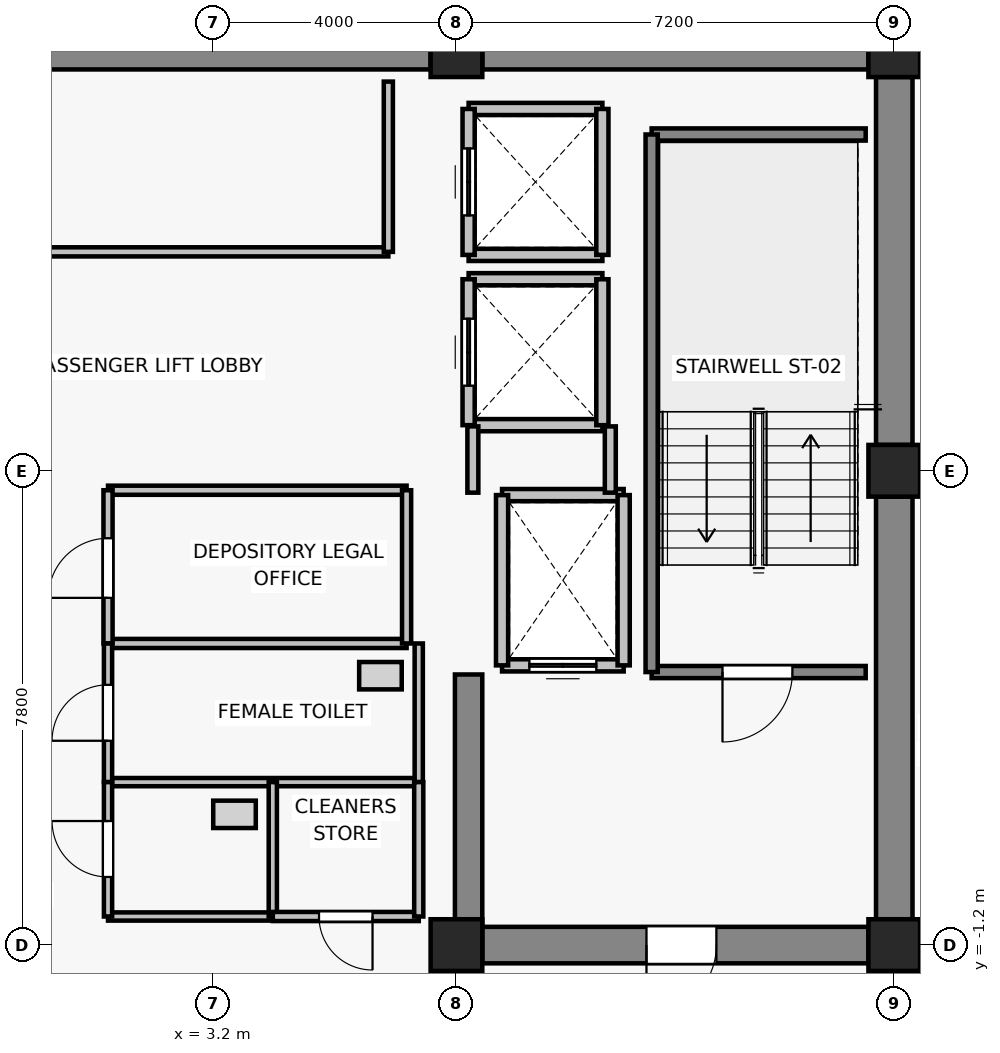
"""IFC4 building model, lengths in metres.
Left out: names, types, materials, properties, quantities, classifications, styles, units other than length and angle.
Written with IfcOpenShell. Run it as: python <this file> out.ifc"""

import sys

from ifc_helpers import new_model, si_unit, direction, frame, frame_2d, origin, origin_2d, place, context, subcontext, project, spatial, rectangle, extrude, source, transform, mapped, element, fill, save


model = new_model("IFC4")
c1 = context("Model", 3, precision=1e-05, world=origin(), true_north=direction((0.0, 1.0)))
c2 = subcontext(c1, "Body", "Model", "MODEL_VIEW")
j1 = project(units=[si_unit("LENGTHUNIT", "METRE"), si_unit("PLANEANGLEUNIT", "RADIAN")], contexts=[c1])
p1 = place(None, origin())
s1 = spatial("IfcSite", under=j1, at=p1, CompositionType="ELEMENT")
p2 = place(p1, origin())
s2 = spatial("IfcBuilding", under=s1, at=p2, CompositionType="ELEMENT")
p3 = place(p2, frame((0.0, 0.0, 238.6)))
s3 = spatial("IfcBuildingStorey", under=s2, at=p3, CompositionType="ELEMENT", Elevation=238.6)
for number, where, z_axis, x_axis in (
    (1, (7.2, -1.2, 0.0), (0.0, 0.0, 1.0), (1.0, 0.0, 0.0)),
    (2, (14.4, -1.2, 0.0), (0.0, 0.0, 1.0), (1.0, 0.0, 0.0)),
    (3, (14.4, 6.6, 0.0), (0.0, 0.0, 1.0), (1.0, 0.0, 0.0)),
    (4, (7.2, 13.5, 0.0), (0.0, 0.0, 1.0), (1.0, 0.0, 0.0)),
    (5, (14.4, 13.5, 0.0), (0.0, 0.0, 1.0), (1.0, 0.0, 0.0)),
):
    element("IfcColumn", number, at=place(p3, frame(where, z_axis=z_axis, x_axis=x_axis)), inside=s3, PredefinedType="COLUMN", context=c2, shape_type="SweptSolid", body=[
        extrude(rectangle(XDim=0.85, YDim=0.85, at=origin_2d()), origin(), (0.0, 0.0, 1.0), 3.3),
    ])
p4 = place(p3, frame((-6.775, 13.5, 0.0), z_axis=(0.0, 0.0, 1.0), x_axis=(1.0, 0.0, 0.0)))
e6 = element("IfcWall", 6, at=p4, inside=s3, PredefinedType="SHEAR", context=c2, shape_type="SweptSolid", body=[
    extrude(rectangle(XDim=13.55, YDim=0.6, at=frame_2d((6.775, 0.0))), origin(), (0.0, 0.0, 1.0), 3.075),
])
p5 = place(p3, frame((7.625, 13.5, 0.0), z_axis=(0.0, 0.0, 1.0), x_axis=(1.0, 0.0, 0.0)))
e7 = element("IfcWall", 7, at=p5, inside=s3, PredefinedType="SHEAR", context=c2, shape_type="SweptSolid", body=[
    extrude(rectangle(XDim=6.35, YDim=0.6, at=frame_2d((3.175, 0.0))), origin(), (0.0, 0.0, 1.0), 3.075),
])
p6 = place(p3, frame((14.4, -0.775, 0.0), z_axis=(0.0, 0.0, 1.0), x_axis=(0.0, 1.0, 0.0)))
e8 = element("IfcWall", 8, at=p6, inside=s3, PredefinedType="SHEAR", context=c2, shape_type="SweptSolid", body=[
    extrude(rectangle(XDim=6.95, YDim=0.6, at=frame_2d((3.475, 0.0))), origin(), (0.0, 0.0, 1.0), 3.075),
])
p7 = place(p3, frame((14.4, 7.025, 0.0), z_axis=(0.0, 0.0, 1.0), x_axis=(0.0, 1.0, 0.0)))
e9 = element("IfcWall", 9, at=p7, inside=s3, PredefinedType="SHEAR", context=c2, shape_type="SweptSolid", body=[
    extrude(rectangle(XDim=6.05, YDim=0.6, at=frame_2d((3.025, 0.0))), origin(), (0.0, 0.0, 1.0), 3.075),
])
p8 = place(p3, frame((13.975, -1.2, 0.0), z_axis=(0.0, 0.0, 1.0), x_axis=(-1.0, 0.0, 0.0)))
e10 = element("IfcWall", 10, at=p8, inside=s3, PredefinedType="SHEAR", context=c2, shape_type="SweptSolid", body=[
    extrude(rectangle(XDim=6.35, YDim=0.6, at=frame_2d((3.175, 0.0))), origin(), (0.0, 0.0, 1.0), 3.075),
])
p9 = place(p8, frame((2.5, 0.0, 0.0)))
e11 = element("IfcOpeningElement", 11, at=p9, cuts=e10, PredefinedType="OPENING", context=c2, shape_type="SweptSolid", body=[
    extrude(rectangle(XDim=1.15, YDim=2.15, at=frame_2d((0.575, 1.075))), frame((0.0, 0.31, 0.0), z_axis=(0.0, -1.0, 0.0), x_axis=(1.0, 0.0, 0.0)), (0.0, 0.0, 1.0), 0.62),
])
p10 = place(p3, frame((7.4, -0.9, 0.0), z_axis=(0.0, 0.0, 1.0), x_axis=(0.0, 1.0, 0.0)))
e12 = element("IfcWall", 12, at=p10, inside=s3, PredefinedType="SHEAR", context=c2, shape_type="SweptSolid", body=[
    extrude(rectangle(XDim=4.15, YDim=0.45, at=frame_2d((2.075, 0.0))), origin(), (0.0, 0.0, 1.0), 3.075),
])
p11 = place(p3, frame((9.95, 3.4, 0.0), z_axis=(0.0, 0.0, 1.0), x_axis=(-1.0, 0.0, 0.0)))
e13 = element("IfcWall", 13, at=p11, inside=s3, PredefinedType="SOLIDWALL", context=c2, shape_type="SweptSolid", body=[
    extrude(rectangle(XDim=2.0, YDim=0.2, at=frame_2d((1.0, 0.0))), origin(), (0.0, 0.0, 1.0), 3.075),
])
p12 = place(p11, frame((0.45, 0.0, 0.0)))
e14 = element("IfcOpeningElement", 14, at=p12, cuts=e13, PredefinedType="OPENING", context=c2, shape_type="SweptSolid", body=[
    extrude(rectangle(XDim=1.1, YDim=2.2, at=frame_2d((0.55, 1.1))), frame((0.0, 0.11, 0.0), z_axis=(0.0, -1.0, 0.0), x_axis=(1.0, 0.0, 0.0)), (0.0, 0.0, 1.0), 0.22),
])
p13 = place(p3, frame((7.95, 6.2, 0.0), z_axis=(0.0, 0.0, 1.0), x_axis=(1.0, 0.0, 0.0)))
e15 = element("IfcWall", 15, at=p13, inside=s3, PredefinedType="SOLIDWALL", context=c2, shape_type="SweptSolid", body=[
    extrude(rectangle(XDim=2.0, YDim=0.2, at=frame_2d((1.0, 0.0))), origin(), (0.0, 0.0, 1.0), 3.075),
])
for number, where, z_axis, x_axis in (
    (16, (7.95, 3.4, 0.0), (0.0, 0.0, 1.0), (0.0, 1.0, 0.0)),
    (17, (9.95, 6.2, 0.0), (0.0, 0.0, 1.0), (0.0, -1.0, 0.0)),
):
    element("IfcWall", number, at=place(p3, frame(where, z_axis=z_axis, x_axis=x_axis)), inside=s3, PredefinedType="SOLIDWALL", context=c2, shape_type="SweptSolid", body=[
        extrude(rectangle(XDim=2.8, YDim=0.2, at=frame_2d((1.4, 0.0))), origin(), (0.0, 0.0, 1.0), 3.075),
    ])
for number, where, z_axis, x_axis in (
    (18, (9.6, 7.35, 0.0), (0.0, 0.0, 1.0), (-1.0, 0.0, 0.0)),
    (19, (7.4, 9.75, 0.0), (0.0, 0.0, 1.0), (1.0, 0.0, 0.0)),
):
    element("IfcWall", number, at=place(p3, frame(where, z_axis=z_axis, x_axis=x_axis)), inside=s3, PredefinedType="SOLIDWALL", context=c2, shape_type="SweptSolid", body=[
        extrude(rectangle(XDim=2.2, YDim=0.2, at=frame_2d((1.1, 0.0))), origin(), (0.0, 0.0, 1.0), 2.615),
    ])
p14 = place(p3, frame((7.4, 7.35, 0.0), z_axis=(0.0, 0.0, 1.0), x_axis=(0.0, 1.0, 0.0)))
e20 = element("IfcWall", 20, at=p14, inside=s3, PredefinedType="SOLIDWALL", context=c2, shape_type="SweptSolid", body=[
    extrude(rectangle(XDim=2.4, YDim=0.2, at=frame_2d((1.2, 0.0))), origin(), (0.0, 0.0, 1.0), 2.615),
])
p15 = place(p14, frame((0.65, 0.0, 0.0)))
e21 = element("IfcOpeningElement", 21, at=p15, cuts=e20, PredefinedType="OPENING", context=c2, shape_type="SweptSolid", body=[
    extrude(rectangle(XDim=1.1, YDim=2.2, at=frame_2d((0.55, 1.1))), frame((0.0, 0.11, 0.0), z_axis=(0.0, -1.0, 0.0), x_axis=(1.0, 0.0, 0.0)), (0.0, 0.0, 1.0), 0.22),
])
p16 = place(p3, frame((9.6, 9.75, 0.0), z_axis=(0.0, 0.0, 1.0), x_axis=(0.0, -1.0, 0.0)))
e22 = element("IfcWall", 22, at=p16, inside=s3, PredefinedType="SOLIDWALL", context=c2, shape_type="SweptSolid", body=[
    extrude(rectangle(XDim=2.4, YDim=0.2, at=frame_2d((1.2, 0.0))), origin(), (0.0, 0.0, 1.0), 3.075),
])
for number, where, z_axis, x_axis in (
    (23, (9.6, 10.15, 0.0), (0.0, 0.0, 1.0), (-1.0, 0.0, 0.0)),
    (24, (7.4, 12.55, 0.0), (0.0, 0.0, 1.0), (1.0, 0.0, 0.0)),
):
    element("IfcWall", number, at=place(p3, frame(where, z_axis=z_axis, x_axis=x_axis)), inside=s3, PredefinedType="SOLIDWALL", context=c2, shape_type="SweptSolid", body=[
        extrude(rectangle(XDim=2.2, YDim=0.2, at=frame_2d((1.1, 0.0))), origin(), (0.0, 0.0, 1.0), 2.615),
    ])
p17 = place(p3, frame((7.4, 10.15, 0.0), z_axis=(0.0, 0.0, 1.0), x_axis=(0.0, 1.0, 0.0)))
e25 = element("IfcWall", 25, at=p17, inside=s3, PredefinedType="SOLIDWALL", context=c2, shape_type="SweptSolid", body=[
    extrude(rectangle(XDim=2.4, YDim=0.2, at=frame_2d((1.2, 0.0))), origin(), (0.0, 0.0, 1.0), 2.615),
])
p18 = place(p17, frame((0.65, 0.0, 0.0)))
e26 = element("IfcOpeningElement", 26, at=p18, cuts=e25, PredefinedType="OPENING", context=c2, shape_type="SweptSolid", body=[
    extrude(rectangle(XDim=1.1, YDim=2.2, at=frame_2d((0.55, 1.1))), frame((0.0, 0.11, 0.0), z_axis=(0.0, -1.0, 0.0), x_axis=(1.0, 0.0, 0.0)), (0.0, 0.0, 1.0), 0.22),
])
p19 = place(p3, frame((9.6, 12.55, 0.0), z_axis=(0.0, 0.0, 1.0), x_axis=(0.0, -1.0, 0.0)))
e27 = element("IfcWall", 27, at=p19, inside=s3, PredefinedType="SOLIDWALL", context=c2, shape_type="SweptSolid", body=[
    extrude(rectangle(XDim=2.4, YDim=0.2, at=frame_2d((1.2, 0.0))), origin(), (0.0, 0.0, 1.0), 3.075),
])
p20 = place(p3, frame((13.93, 3.29, 0.0), z_axis=(0.0, 0.0, 1.0), x_axis=(-1.0, 0.0, 0.0)))
e28 = element("IfcWall", 28, at=p20, inside=s3, PredefinedType="SOLIDWALL", context=c2, shape_type="SweptSolid", body=[
    extrude(rectangle(XDim=3.52, YDim=0.2, at=frame_2d((1.76, 0.0))), origin(), (0.0, 0.0, 1.0), 3.075),
])
p21 = place(p20, frame((1.205, 0.0, 0.0)))
e29 = element("IfcOpeningElement", 29, at=p21, cuts=e28, PredefinedType="OPENING", context=c2, shape_type="SweptSolid", body=[
    extrude(rectangle(XDim=1.15, YDim=2.15, at=frame_2d((0.575, 1.075))), frame((0.0, 0.11, 0.0), z_axis=(0.0, -1.0, 0.0), x_axis=(1.0, 0.0, 0.0)), (0.0, 0.0, 1.0), 0.22),
])
p22 = place(p3, frame((10.41, 12.13, 0.0), z_axis=(0.0, 0.0, 1.0), x_axis=(1.0, 0.0, 0.0)))
e30 = element("IfcWall", 30, at=p22, inside=s3, PredefinedType="SOLIDWALL", context=c2, shape_type="SweptSolid", body=[
    extrude(rectangle(XDim=3.52, YDim=0.2, at=frame_2d((1.76, 0.0))), origin(), (0.0, 0.0, 1.0), 3.075),
])
p23 = place(p3, frame((10.41, 3.29, 0.0), z_axis=(0.0, 0.0, 1.0), x_axis=(0.0, 1.0, 0.0)))
e31 = element("IfcWall", 31, at=p23, inside=s3, PredefinedType="SOLIDWALL", context=c2, shape_type="SweptSolid", body=[
    extrude(rectangle(XDim=8.84, YDim=0.2, at=frame_2d((4.42, 0.0))), origin(), (0.0, 0.0, 1.0), 3.075),
])
p24 = place(p3, frame((7.47, 6.24, 0.0), z_axis=(0.0, 0.0, 1.0), x_axis=(0.0, 1.0, 0.0)))
e32 = element("IfcWall", 32, at=p24, inside=s3, PredefinedType="PARTITIONING", context=c2, shape_type="SweptSolid", body=[
    extrude(rectangle(XDim=1.09, YDim=0.18, at=frame_2d((0.545, 0.0))), origin(), (0.0, 0.0, 1.0), 2.615),
])
p25 = place(p3, frame((9.73, 7.33, 0.0), z_axis=(0.0, 0.0, 1.0), x_axis=(0.0, -1.0, 0.0)))
e33 = element("IfcWall", 33, at=p25, inside=s3, PredefinedType="PARTITIONING", context=c2, shape_type="SweptSolid", body=[
    extrude(rectangle(XDim=1.09, YDim=0.18, at=frame_2d((0.545, 0.0))), origin(), (0.0, 0.0, 1.0), 3.075),
])
p26 = place(p3, frame((6.08, 10.2, 0.0), z_axis=(0.0, 0.0, 1.0), x_axis=(-1.0, 0.0, 0.0)))
e34 = element("IfcWall", 34, at=p26, inside=s3, PredefinedType="PARTITIONING", context=c2, shape_type="SweptSolid", body=[
    extrude(rectangle(XDim=12.16, YDim=0.15, at=frame_2d((6.08, 0.0))), origin(), (0.0, 0.0, 1.0), 3.075),
])
p27 = place(p26, frame((7.005, 0.0, 0.0)))
e35 = element("IfcOpeningElement", 35, at=p27, cuts=e34, PredefinedType="OPENING", context=c2, shape_type="SweptSolid", body=[
    extrude(rectangle(XDim=1.15, YDim=2.15, at=frame_2d((0.575, 1.075))), frame((0.0, 0.085, 0.0), z_axis=(0.0, -1.0, 0.0), x_axis=(1.0, 0.0, 0.0)), (0.0, 0.0, 1.0), 0.17),
])
p28 = place(p3, frame((6.08, 13.0, 0.0), z_axis=(0.0, 0.0, 1.0), x_axis=(0.0, -1.0, 0.0)))
e36 = element("IfcWall", 36, at=p28, inside=s3, PredefinedType="PARTITIONING", context=c2, shape_type="SweptSolid", body=[
    extrude(rectangle(XDim=2.8, YDim=0.15, at=frame_2d((1.4, 0.0))), origin(), (0.0, 0.0, 1.0), 3.075),
])
for number, where, z_axis, x_axis in (
    (37, (6.38, 3.76, 0.0), (0.0, 0.0, 1.0), (-1.0, 0.0, 0.0)),
    (38, (1.47, 6.28, 0.0), (0.0, 0.0, 1.0), (1.0, 0.0, 0.0)),
):
    element("IfcWall", number, at=place(p3, frame(where, z_axis=z_axis, x_axis=x_axis)), inside=s3, PredefinedType="PARTITIONING", context=c2, shape_type="SweptSolid", body=[
        extrude(rectangle(XDim=4.91, YDim=0.15, at=frame_2d((2.455, 0.0))), origin(), (0.0, 0.0, 1.0), 3.075),
    ])
p29 = place(p3, frame((1.47, 3.76, 0.0), z_axis=(0.0, 0.0, 1.0), x_axis=(0.0, 1.0, 0.0)))
e39 = element("IfcWall", 39, at=p29, inside=s3, PredefinedType="PARTITIONING", context=c2, shape_type="SweptSolid", body=[
    extrude(rectangle(XDim=2.52, YDim=0.15, at=frame_2d((1.26, 0.0))), origin(), (0.0, 0.0, 1.0), 3.075),
])
p30 = place(p29, frame((0.75, 0.0, 0.0)))
e40 = element("IfcOpeningElement", 40, at=p30, cuts=e39, PredefinedType="OPENING", context=c2, shape_type="SweptSolid", body=[
    extrude(rectangle(XDim=0.98, YDim=2.15, at=frame_2d((0.49, 1.075))), frame((0.0, 0.085, 0.0), z_axis=(0.0, -1.0, 0.0), x_axis=(1.0, 0.0, 0.0)), (0.0, 0.0, 1.0), 0.17),
])
p31 = place(p3, frame((6.38, 6.28, 0.0), z_axis=(0.0, 0.0, 1.0), x_axis=(0.0, -1.0, 0.0)))
e41 = element("IfcWall", 41, at=p31, inside=s3, PredefinedType="PARTITIONING", context=c2, shape_type="SweptSolid", body=[
    extrude(rectangle(XDim=2.52, YDim=0.15, at=frame_2d((1.26, 0.0))), origin(), (0.0, 0.0, 1.0), 3.075),
])
p32 = place(p3, frame((6.58, 1.48, 0.0), z_axis=(0.0, 0.0, 1.0), x_axis=(-1.0, 0.0, 0.0)))
e42 = element("IfcWall", 42, at=p32, inside=s3, PredefinedType="PARTITIONING", context=c2, shape_type="SweptSolid", body=[
    extrude(rectangle(XDim=5.11, YDim=0.135, at=frame_2d((2.555, 0.0))), origin(), (0.0, 0.0, 1.0), 3.075),
])
p33 = place(p3, frame((1.47, 1.48, 0.0), z_axis=(0.0, 0.0, 1.0), x_axis=(0.0, 1.0, 0.0)))
e43 = element("IfcWall", 43, at=p33, inside=s3, PredefinedType="PARTITIONING", context=c2, shape_type="SweptSolid", body=[
    extrude(rectangle(XDim=2.28, YDim=0.135, at=frame_2d((1.14, 0.0))), origin(), (0.0, 0.0, 1.0), 3.075),
])
p34 = place(p33, frame((0.68, 0.0, 0.0)))
e44 = element("IfcOpeningElement", 44, at=p34, cuts=e43, PredefinedType="OPENING", context=c2, shape_type="SweptSolid", body=[
    extrude(rectangle(XDim=0.92, YDim=2.1, at=frame_2d((0.46, 1.05))), frame((0.0, 0.077, 0.0), z_axis=(0.0, -1.0, 0.0), x_axis=(1.0, 0.0, 0.0)), (0.0, 0.0, 1.0), 0.155),
])
p35 = place(p3, frame((6.58, 3.76, 0.0), z_axis=(0.0, 0.0, 1.0), x_axis=(0.0, -1.0, 0.0)))
e45 = element("IfcWall", 45, at=p35, inside=s3, PredefinedType="PARTITIONING", context=c2, shape_type="SweptSolid", body=[
    extrude(rectangle(XDim=2.28, YDim=0.135, at=frame_2d((1.14, 0.0))), origin(), (0.0, 0.0, 1.0), 3.075),
])
p36 = place(p3, frame((4.18, -0.73, 0.0), z_axis=(0.0, 0.0, 1.0), x_axis=(-1.0, 0.0, 0.0)))
e46 = element("IfcWall", 46, at=p36, inside=s3, PredefinedType="PARTITIONING", context=c2, shape_type="SweptSolid", body=[
    extrude(rectangle(XDim=2.71, YDim=0.135, at=frame_2d((1.355, 0.0))), origin(), (0.0, 0.0, 1.0), 3.075),
])
p37 = place(p3, frame((1.47, -0.73, 0.0), z_axis=(0.0, 0.0, 1.0), x_axis=(0.0, 1.0, 0.0)))
e47 = element("IfcWall", 47, at=p37, inside=s3, PredefinedType="PARTITIONING", context=c2, shape_type="SweptSolid", body=[
    extrude(rectangle(XDim=2.21, YDim=0.135, at=frame_2d((1.105, 0.0))), origin(), (0.0, 0.0, 1.0), 3.075),
])
p38 = place(p37, frame((0.65, 0.0, 0.0)))
e48 = element("IfcOpeningElement", 48, at=p38, cuts=e47, PredefinedType="OPENING", context=c2, shape_type="SweptSolid", body=[
    extrude(rectangle(XDim=0.92, YDim=2.1, at=frame_2d((0.46, 1.05))), frame((0.0, 0.077, 0.0), z_axis=(0.0, -1.0, 0.0), x_axis=(1.0, 0.0, 0.0)), (0.0, 0.0, 1.0), 0.155),
])
p39 = place(p3, frame((4.18, 1.48, 0.0), z_axis=(0.0, 0.0, 1.0), x_axis=(0.0, -1.0, 0.0)))
e49 = element("IfcWall", 49, at=p39, inside=s3, PredefinedType="PARTITIONING", context=c2, shape_type="SweptSolid", body=[
    extrude(rectangle(XDim=2.21, YDim=0.135, at=frame_2d((1.105, 0.0))), origin(), (0.0, 0.0, 1.0), 3.075),
])
p40 = place(p3, frame((6.58, -0.73, 0.0), z_axis=(0.0, 0.0, 1.0), x_axis=(-1.0, 0.0, 0.0)))
e50 = element("IfcWall", 50, at=p40, inside=s3, PredefinedType="PARTITIONING", context=c2, shape_type="SweptSolid", body=[
    extrude(rectangle(XDim=2.4, YDim=0.15, at=frame_2d((1.2, 0.0))), origin(), (0.0, 0.0, 1.0), 3.075),
])
p41 = place(p40, frame((0.76, 0.0, 0.0)))
e51 = element("IfcOpeningElement", 51, at=p41, cuts=e50, PredefinedType="OPENING", context=c2, shape_type="SweptSolid", body=[
    extrude(rectangle(XDim=0.88, YDim=2.1, at=frame_2d((0.44, 1.05))), frame((0.0, 0.085, 0.0), z_axis=(0.0, -1.0, 0.0), x_axis=(1.0, 0.0, 0.0)), (0.0, 0.0, 1.0), 0.17),
])
p42 = place(p3, frame((6.58, 1.48, 0.0), z_axis=(0.0, 0.0, 1.0), x_axis=(0.0, -1.0, 0.0)))
e52 = element("IfcWall", 52, at=p42, inside=s3, PredefinedType="PARTITIONING", context=c2, shape_type="SweptSolid", body=[
    extrude(rectangle(XDim=2.21, YDim=0.15, at=frame_2d((1.105, 0.0))), origin(), (0.0, 0.0, 1.0), 3.075),
])
m1 = source(origin(), c2, "Body", "SweptSolid", [
    extrude(rectangle(XDim=1.1, YDim=2.2, at=frame_2d((0.55, 1.1))), frame((0.0, 0.025, 0.0), z_axis=(0.0, -1.0, 0.0), x_axis=(1.0, 0.0, 0.0)), (0.0, 0.0, 1.0), 0.05),
])
p43 = place(p12, origin())
e53 = element("IfcDoor", 53, at=p43, inside=s3, OperationType="DOUBLE_DOOR_SLIDING", PredefinedType="DOOR", context=c2, shape_type="MappedRepresentation", body=[
    mapped(m1, transform((0.0, 0.0, 0.0), x_axis=(1.0, 0.0, 0.0), y_axis=(0.0, 1.0, 0.0), z_axis=(0.0, 0.0, 1.0), scale=1.0)),
])
fill(e14, e53)
p44 = place(p15, origin())
e54 = element("IfcDoor", 54, at=p44, inside=s3, OperationType="DOUBLE_DOOR_SLIDING", PredefinedType="DOOR", context=c2, shape_type="MappedRepresentation", body=[
    mapped(m1, transform((0.0, 0.0, 0.0), x_axis=(1.0, 0.0, 0.0), y_axis=(0.0, 1.0, 0.0), z_axis=(0.0, 0.0, 1.0), scale=1.0)),
])
fill(e21, e54)
p45 = place(p18, origin())
e55 = element("IfcDoor", 55, at=p45, inside=s3, OperationType="DOUBLE_DOOR_SLIDING", PredefinedType="DOOR", context=c2, shape_type="MappedRepresentation", body=[
    mapped(m1, transform((0.0, 0.0, 0.0), x_axis=(1.0, 0.0, 0.0), y_axis=(0.0, 1.0, 0.0), z_axis=(0.0, 0.0, 1.0), scale=1.0)),
])
fill(e26, e55)
m2 = source(origin(), c2, "Body", "SweptSolid", [
    extrude(rectangle(XDim=1.15, YDim=2.15, at=frame_2d((0.575, 1.075))), frame((0.0, 0.025, 0.0), z_axis=(0.0, -1.0, 0.0), x_axis=(1.0, 0.0, 0.0)), (0.0, 0.0, 1.0), 0.05),
])
p46 = place(p21, origin())
e56 = element("IfcDoor", 56, at=p46, inside=s3, OperationType="SINGLE_SWING_RIGHT", PredefinedType="DOOR", context=c2, shape_type="MappedRepresentation", body=[
    mapped(m2, transform((0.0, 0.0, 0.0), x_axis=(1.0, 0.0, 0.0), y_axis=(0.0, 1.0, 0.0), z_axis=(0.0, 0.0, 1.0), scale=1.0)),
])
fill(e29, e56)
p47 = place(p9, origin())
e57 = element("IfcDoor", 57, at=p47, inside=s3, OperationType="SINGLE_SWING_RIGHT", PredefinedType="DOOR", context=c2, shape_type="MappedRepresentation", body=[
    mapped(m2, transform((0.0, 0.0, 0.0), x_axis=(1.0, 0.0, 0.0), y_axis=(0.0, 1.0, 0.0), z_axis=(0.0, 0.0, 1.0), scale=1.0)),
])
fill(e11, e57)
m3 = source(origin(), c2, "Body", "SweptSolid", [
    extrude(rectangle(XDim=0.98, YDim=2.15, at=frame_2d((0.49, 1.075))), frame((0.0, 0.025, 0.0), z_axis=(0.0, -1.0, 0.0), x_axis=(1.0, 0.0, 0.0)), (0.0, 0.0, 1.0), 0.05),
])
p48 = place(p30, origin())
e58 = element("IfcDoor", 58, at=p48, inside=s3, OperationType="SINGLE_SWING_LEFT", PredefinedType="DOOR", context=c2, shape_type="MappedRepresentation", body=[
    mapped(m3, transform((0.0, 0.0, 0.0), x_axis=(1.0, 0.0, 0.0), y_axis=(0.0, 1.0, 0.0), z_axis=(0.0, 0.0, 1.0), scale=1.0)),
])
fill(e40, e58)
m4 = source(origin(), c2, "Body", "SweptSolid", [
    extrude(rectangle(XDim=0.92, YDim=2.1, at=frame_2d((0.46, 1.05))), frame((0.0, 0.025, 0.0), z_axis=(0.0, -1.0, 0.0), x_axis=(1.0, 0.0, 0.0)), (0.0, 0.0, 1.0), 0.05),
])
p49 = place(p34, origin())
e59 = element("IfcDoor", 59, at=p49, inside=s3, OperationType="SINGLE_SWING_LEFT", PredefinedType="DOOR", context=c2, shape_type="MappedRepresentation", body=[
    mapped(m4, transform((0.0, 0.0, 0.0), x_axis=(1.0, 0.0, 0.0), y_axis=(0.0, 1.0, 0.0), z_axis=(0.0, 0.0, 1.0), scale=1.0)),
])
fill(e44, e59)
p50 = place(p38, origin())
e60 = element("IfcDoor", 60, at=p50, inside=s3, OperationType="SINGLE_SWING_RIGHT", PredefinedType="DOOR", context=c2, shape_type="MappedRepresentation", body=[
    mapped(m4, transform((0.0, 0.0, 0.0), x_axis=(1.0, 0.0, 0.0), y_axis=(0.0, 1.0, 0.0), z_axis=(0.0, 0.0, 1.0), scale=1.0)),
])
fill(e48, e60)
m5 = source(origin(), c2, "Body", "SweptSolid", [
    extrude(rectangle(XDim=0.88, YDim=2.1, at=frame_2d((0.44, 1.05))), frame((0.0, 0.025, 0.0), z_axis=(0.0, -1.0, 0.0), x_axis=(1.0, 0.0, 0.0)), (0.0, 0.0, 1.0), 0.05),
])
p51 = place(p41, origin())
e61 = element("IfcDoor", 61, at=p51, inside=s3, OperationType="SINGLE_SWING_LEFT", PredefinedType="DOOR", context=c2, shape_type="MappedRepresentation", body=[
    mapped(m5, transform((0.0, 0.0, 0.0), x_axis=(1.0, 0.0, 0.0), y_axis=(0.0, 1.0, 0.0), z_axis=(0.0, 0.0, 1.0), scale=1.0)),
])
fill(e51, e61)
save(model, sys.argv[1])
